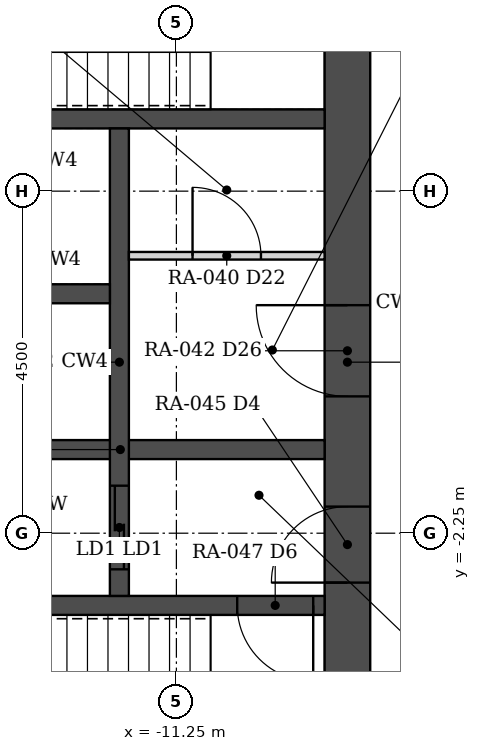
"""IFC4 building model, lengths in metres.
Left out: names, types, materials, properties, quantities, classifications, styles, units other than length and angle.
Written with IfcOpenShell. Run it as: python <this file> out.ifc"""

import sys

from ifc_helpers import new_model, si_unit, direction, frame, frame_2d, origin, place, context, subcontext, project, spatial, rectangle, extrude, element, fill, save


model = new_model("IFC4")
c1 = context("Model", 3, precision=1e-05, world=origin(), true_north=direction((0.0, 1.0)))
c2 = subcontext(c1, "Body", "Model", "MODEL_VIEW")
j1 = project(units=[si_unit("LENGTHUNIT", "METRE"), si_unit("PLANEANGLEUNIT", "RADIAN")], contexts=[c1])
p1 = place(None, origin())
s1 = spatial("IfcSite", under=j1, at=p1, CompositionType="ELEMENT")
p2 = place(p1, origin())
s2 = spatial("IfcBuilding", under=s1, at=p2, CompositionType="ELEMENT")
p3 = place(p2, frame((0.0, 0.0, 26.5)))
s3 = spatial("IfcBuildingStorey", under=s2, at=p3, CompositionType="ELEMENT", Elevation=26.5)
p4 = place(p3, frame((-9.0, -6.45, 0.0), z_axis=(0.0, 0.0, 1.0), x_axis=(0.0, 1.0, 0.0)))
e1 = element("IfcWall", 1, at=p4, inside=s3, PredefinedType="SHEAR", context=c2, shape_type="SweptSolid", body=[
    extrude(rectangle(XDim=12.9, YDim=0.6, at=frame_2d((6.45, 0.0))), origin(), (0.0, 0.0, 1.0), 3.5),
])
p5 = place(p4, frame((3.55, 0.0, 0.0)))
e2 = element("IfcOpeningElement", 2, at=p5, cuts=e1, PredefinedType="OPENING", context=c2, shape_type="SweptSolid", body=[
    extrude(rectangle(XDim=1.0, YDim=2.1, at=frame_2d((0.5, 1.05))), frame((0.0, 0.31, 0.0), z_axis=(0.0, -1.0, 0.0), x_axis=(1.0, 0.0, 0.0)), (0.0, 0.0, 1.0), 0.62),
])
p6 = place(p4, frame((6.0, 0.0, 0.0)))
e3 = element("IfcOpeningElement", 3, at=p6, cuts=e1, PredefinedType="OPENING", context=c2, shape_type="SweptSolid", body=[
    extrude(rectangle(XDim=1.2, YDim=2.1, at=frame_2d((0.6, 1.05))), frame((0.0, 0.31, 0.0), z_axis=(0.0, -1.0, 0.0), x_axis=(1.0, 0.0, 0.0)), (0.0, 0.0, 1.0), 0.62),
])
p7 = place(p4, frame((10.85, 0.0, 0.0)))
e4 = element("IfcOpeningElement", 4, at=p7, cuts=e1, PredefinedType="OPENING", context=c2, shape_type="SweptSolid", body=[
    extrude(rectangle(XDim=1.0, YDim=2.1, at=frame_2d((0.5, 1.05))), frame((0.0, 0.31, 0.0), z_axis=(0.0, -1.0, 0.0), x_axis=(1.0, 0.0, 0.0)), (0.0, 0.0, 1.0), 0.62),
])
p8 = place(p3, frame((-9.3, -3.2, 0.0), z_axis=(0.0, 0.0, 1.0), x_axis=(-1.0, 0.0, 0.0)))
e5 = element("IfcWall", 5, at=p8, inside=s3, PredefinedType="SHEAR", context=c2, shape_type="SweptSolid", body=[
    extrude(rectangle(XDim=8.4, YDim=0.25, at=frame_2d((4.2, 0.0))), origin(), (0.0, 0.0, 1.0), 3.5),
])
p9 = place(p8, frame((0.15, 0.0, 0.0)))
e6 = element("IfcOpeningElement", 6, at=p9, cuts=e5, PredefinedType="OPENING", context=c2, shape_type="SweptSolid", body=[
    extrude(rectangle(XDim=1.0, YDim=2.1, at=frame_2d((0.5, 1.05))), frame((0.0, 0.135, 0.0), z_axis=(0.0, -1.0, 0.0), x_axis=(1.0, 0.0, 0.0)), (0.0, 0.0, 1.0), 0.27),
])
p10 = place(p3, frame((-9.3, 3.2, 0.0), z_axis=(0.0, 0.0, 1.0), x_axis=(-1.0, 0.0, 0.0)))
e7 = element("IfcWall", 7, at=p10, inside=s3, PredefinedType="SHEAR", context=c2, shape_type="SweptSolid", body=[
    extrude(rectangle(XDim=8.4, YDim=0.25, at=frame_2d((4.2, 0.0))), origin(), (0.0, 0.0, 1.0), 3.5),
])
p11 = place(p3, frame((-9.3, -1.15, 0.0), z_axis=(0.0, 0.0, 1.0), x_axis=(-1.0, 0.0, 0.0)))
e8 = element("IfcWall", 8, at=p11, inside=s3, PredefinedType="SHEAR", context=c2, shape_type="SweptSolid", body=[
    extrude(rectangle(XDim=5.375, YDim=0.25, at=frame_2d((2.688, 0.0))), origin(), (0.0, 0.0, 1.0), 3.5),
])
p12 = place(p3, frame((-12.0, -3.075, 0.0), z_axis=(0.0, 0.0, 1.0), x_axis=(0.0, 1.0, 0.0)))
e9 = element("IfcWall", 9, at=p12, inside=s3, PredefinedType="SHEAR", context=c2, shape_type="SweptSolid", body=[
    extrude(rectangle(XDim=6.15, YDim=0.25, at=frame_2d((3.075, 0.0))), origin(), (0.0, 0.0, 1.0), 3.5),
])
p13 = place(p12, frame((0.35, 0.0, 0.0)))
e10 = element("IfcOpeningElement", 10, at=p13, cuts=e9, PredefinedType="OPENING", context=c2, shape_type="SweptSolid", body=[
    extrude(rectangle(XDim=1.1, YDim=2.1, at=frame_2d((0.55, 1.05))), frame((0.0, 0.135, 0.0), z_axis=(0.0, -1.0, 0.0), x_axis=(1.0, 0.0, 0.0)), (0.0, 0.0, 1.0), 0.27),
])
p14 = place(p3, frame((-12.125, 0.9, 0.0), z_axis=(0.0, 0.0, 1.0), x_axis=(-1.0, 0.0, 0.0)))
e11 = element("IfcWall", 11, at=p14, inside=s3, PredefinedType="SHEAR", context=c2, shape_type="SweptSolid", body=[
    extrude(rectangle(XDim=2.55, YDim=0.25, at=frame_2d((1.275, 0.0))), origin(), (0.0, 0.0, 1.0), 3.5),
])
p15 = place(p3, frame((-11.875, 1.4, 0.0), z_axis=(0.0, 0.0, 1.0), x_axis=(1.0, 0.0, 0.0)))
e12 = element("IfcWall", 12, at=p15, inside=s3, PredefinedType="PARTITIONING", context=c2, shape_type="SweptSolid", body=[
    extrude(rectangle(XDim=2.575, YDim=0.1, at=frame_2d((1.288, 0.0))), origin(), (0.0, 0.0, 1.0), 2.373),
])
p16 = place(p15, frame((0.837, 0.0, 0.0)))
e13 = element("IfcOpeningElement", 13, at=p16, cuts=e12, PredefinedType="OPENING", context=c2, shape_type="SweptSolid", body=[
    extrude(rectangle(XDim=0.9, YDim=2.1, at=frame_2d((0.45, 1.05))), frame((0.0, 0.06, 0.0), z_axis=(0.0, -1.0, 0.0), x_axis=(1.0, 0.0, 0.0)), (0.0, 0.0, 1.0), 0.12),
])
p17 = place(p5, origin())
e14 = element("IfcDoor", 14, at=p17, inside=s3, OperationType="SINGLE_SWING_LEFT", PredefinedType="DOOR", context=c2, shape_type="SweptSolid", body=[
    extrude(rectangle(XDim=1.0, YDim=2.1, at=frame_2d((0.5, 1.05))), frame((0.0, 0.025, 0.0), z_axis=(0.0, -1.0, 0.0), x_axis=(1.0, 0.0, 0.0)), (0.0, 0.0, 1.0), 0.05),
])
fill(e2, e14)
p18 = place(p9, origin())
e15 = element("IfcDoor", 15, at=p18, inside=s3, OperationType="SINGLE_SWING_LEFT", PredefinedType="DOOR", context=c2, shape_type="SweptSolid", body=[
    extrude(rectangle(XDim=1.0, YDim=2.1, at=frame_2d((0.5, 1.05))), frame((0.0, 0.025, 0.0), z_axis=(0.0, -1.0, 0.0), x_axis=(1.0, 0.0, 0.0)), (0.0, 0.0, 1.0), 0.05),
])
fill(e6, e15)
p19 = place(p6, origin())
e16 = element("IfcDoor", 16, at=p19, inside=s3, OperationType="SINGLE_SWING_RIGHT", PredefinedType="DOOR", context=c2, shape_type="SweptSolid", body=[
    extrude(rectangle(XDim=1.2, YDim=2.1, at=frame_2d((0.6, 1.05))), frame((0.0, 0.025, 0.0), z_axis=(0.0, -1.0, 0.0), x_axis=(1.0, 0.0, 0.0)), (0.0, 0.0, 1.0), 0.05),
])
fill(e3, e16)
p20 = place(p16, origin())
e17 = element("IfcDoor", 17, at=p20, inside=s3, OperationType="SINGLE_SWING_LEFT", PredefinedType="DOOR", context=c2, shape_type="SweptSolid", body=[
    extrude(rectangle(XDim=0.9, YDim=2.1, at=frame_2d((0.45, 1.05))), frame((0.0, 0.025, 0.0), z_axis=(0.0, -1.0, 0.0), x_axis=(1.0, 0.0, 0.0)), (0.0, 0.0, 1.0), 0.05),
])
fill(e13, e17)
p21 = place(p13, origin())
e18 = element("IfcDoor", 18, at=p21, inside=s3, OperationType="DOUBLE_DOOR_SLIDING", PredefinedType="DOOR", context=c2, shape_type="SweptSolid", body=[
    extrude(rectangle(XDim=1.1, YDim=2.1, at=frame_2d((0.55, 1.05))), frame((0.0, 0.025, 0.0), z_axis=(0.0, -1.0, 0.0), x_axis=(1.0, 0.0, 0.0)), (0.0, 0.0, 1.0), 0.05),
])
fill(e10, e18)
save(model, sys.argv[1])
